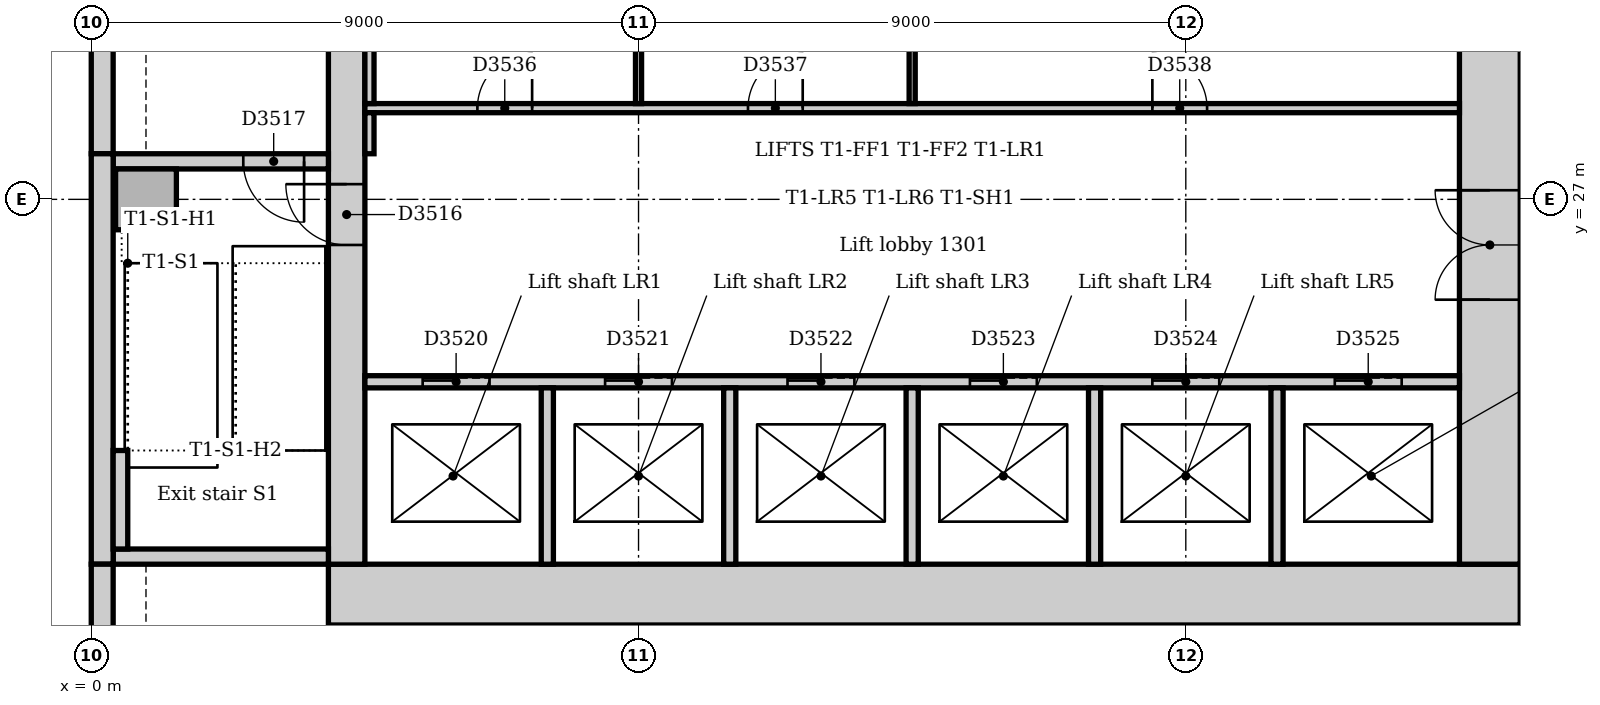
"""IFC4 building model, lengths in metres.
Left out: names, types, materials, properties, quantities, classifications, styles, units other than length and angle.
Written with IfcOpenShell. Run it as: python <this file> out.ifc"""

import sys

from ifc_helpers import new_model, si_unit, direction, frame, frame_2d, origin, origin_2d, place, context, subcontext, project, spatial, rectangle, extrude, element, fill, save


model = new_model("IFC4")
c1 = context("Model", 3, precision=1e-05, world=origin(), true_north=direction((0.0, 1.0)))
c2 = subcontext(c1, "Body", "Model", "MODEL_VIEW")
j1 = project(units=[si_unit("LENGTHUNIT", "METRE"), si_unit("PLANEANGLEUNIT", "RADIAN")], contexts=[c1])
p1 = place(None, origin())
s1 = spatial("IfcSite", under=j1, at=p1, CompositionType="ELEMENT")
p2 = place(p1, origin())
s2 = spatial("IfcBuilding", under=s1, at=p2, CompositionType="ELEMENT")
p3 = place(p2, frame((0.0, 0.0, 59.0)))
s3 = spatial("IfcBuildingStorey", under=s2, at=p3, CompositionType="ELEMENT", Elevation=59.0)
p4 = place(p3, frame((3.9, 20.5, 0.0), z_axis=(0.0, 0.0, 1.0), x_axis=(1.0, 0.0, 0.0)))
e1 = element("IfcWall", 1, at=p4, inside=s3, PredefinedType="SOLIDWALL", context=c2, shape_type="SweptSolid", body=[
    extrude(rectangle(XDim=19.6, YDim=1.0, at=frame_2d((9.8, 0.0))), origin(), (0.0, 0.0, 1.0), 4.0),
])
p5 = place(p3, frame((23.0, 21.0, 0.0), z_axis=(0.0, 0.0, 1.0), x_axis=(0.0, 1.0, 0.0)))
e2 = element("IfcWall", 2, at=p5, inside=s3, PredefinedType="SOLIDWALL", context=c2, shape_type="SweptSolid", body=[
    extrude(rectangle(XDim=10.5, YDim=1.0, at=frame_2d((5.25, 0.0))), origin(), (0.0, 0.0, 1.0), 4.0),
])
p6 = place(p5, frame((4.35, 0.0, 0.0)))
e3 = element("IfcOpeningElement", 3, at=p6, cuts=e2, PredefinedType="OPENING", context=c2, shape_type="SweptSolid", body=[
    extrude(rectangle(XDim=1.8, YDim=2.1, at=frame_2d((0.9, 1.05))), frame((0.0, 0.51, 0.0), z_axis=(0.0, -1.0, 0.0), x_axis=(1.0, 0.0, 0.0)), (0.0, 0.0, 1.0), 1.02),
])
p7 = place(p3, frame((4.2, 31.5, 0.0), z_axis=(0.0, 0.0, 1.0), x_axis=(0.0, -1.0, 0.0)))
e4 = element("IfcWall", 4, at=p7, inside=s3, PredefinedType="SOLIDWALL", context=c2, shape_type="SweptSolid", body=[
    extrude(rectangle(XDim=10.5, YDim=0.6, at=frame_2d((5.25, 0.0))), origin(), (0.0, 0.0, 1.0), 4.0),
])
p8 = place(p7, frame((4.25, 0.0, 0.0)))
e5 = element("IfcOpeningElement", 5, at=p8, cuts=e4, PredefinedType="OPENING", context=c2, shape_type="SweptSolid", body=[
    extrude(rectangle(XDim=1.0, YDim=2.1, at=frame_2d((0.5, 1.05))), frame((0.0, 0.31, 0.0), z_axis=(0.0, -1.0, 0.0), x_axis=(1.0, 0.0, 0.0)), (0.0, 0.0, 1.0), 0.62),
])
p9 = place(p3, frame((0.36, 21.125, 0.0), z_axis=(0.0, 0.0, 1.0), x_axis=(1.0, 0.0, 0.0)))
e6 = element("IfcWall", 6, at=p9, inside=s3, PredefinedType="SOLIDWALL", context=c2, shape_type="SweptSolid", body=[
    extrude(rectangle(XDim=3.54, YDim=0.25, at=frame_2d((1.77, 0.0))), origin(), (0.0, 0.0, 1.0), 4.0),
])
p10 = place(p3, frame((3.9, 27.625, 0.0), z_axis=(0.0, 0.0, 1.0), x_axis=(-1.0, 0.0, 0.0)))
e7 = element("IfcWall", 7, at=p10, inside=s3, PredefinedType="SOLIDWALL", context=c2, shape_type="SweptSolid", body=[
    extrude(rectangle(XDim=3.54, YDim=0.25, at=frame_2d((1.77, 0.0))), origin(), (0.0, 0.0, 1.0), 4.0),
])
p11 = place(p10, frame((0.4, 0.0, 0.0)))
e8 = element("IfcOpeningElement", 8, at=p11, cuts=e7, PredefinedType="OPENING", context=c2, shape_type="SweptSolid", body=[
    extrude(rectangle(XDim=1.0, YDim=2.1, at=frame_2d((0.5, 1.05))), frame((0.0, 0.135, 0.0), z_axis=(0.0, -1.0, 0.0), x_axis=(1.0, 0.0, 0.0)), (0.0, 0.0, 1.0), 0.27),
])
p12 = place(p3, frame((0.9, 27.0, 0.0), z_axis=(0.0, 0.0, 1.0), x_axis=(1.0, 0.0, 0.0)))
e9 = element("IfcColumn", 9, at=p12, inside=s3, PredefinedType="COLUMN", context=c2, shape_type="SweptSolid", body=[
    extrude(rectangle(XDim=1.0, YDim=1.0, at=origin_2d()), origin(), (0.0, 0.0, 1.0), 4.0),
])
p13 = place(p3, frame((0.18, 35.25, 0.0), z_axis=(0.0, 0.0, 1.0), x_axis=(0.0, -1.0, 0.0)))
e10 = element("IfcWall", 10, at=p13, inside=s3, PredefinedType="STANDARD", context=c2, shape_type="SweptSolid", body=[
    extrude(rectangle(XDim=7.5, YDim=0.36, at=frame_2d((3.75, 0.0))), origin(), (0.0, 0.0, 1.0), 3.85),
])
p14 = place(p3, frame((0.18, 27.75, 0.0), z_axis=(0.0, 0.0, 1.0), x_axis=(0.0, -1.0, 0.0)))
e11 = element("IfcWall", 11, at=p14, inside=s3, PredefinedType="STANDARD", context=c2, shape_type="SweptSolid", body=[
    extrude(rectangle(XDim=6.75, YDim=0.36, at=frame_2d((3.375, 0.0))), origin(), (0.0, 0.0, 1.0), 3.85),
])
p15 = place(p3, frame((0.18, 21.0, 0.0), z_axis=(0.0, 0.0, 1.0), x_axis=(0.0, -1.0, 0.0)))
e12 = element("IfcWall", 12, at=p15, inside=s3, PredefinedType="STANDARD", context=c2, shape_type="SweptSolid", body=[
    extrude(rectangle(XDim=16.757, YDim=0.36, at=frame_2d((8.379, 0.0))), origin(), (0.0, 0.0, 1.0), 3.85),
])
p16 = place(p15, frame((1.35, 0.0, 0.9)))
e13 = element("IfcOpeningElement", 13, at=p16, cuts=e12, PredefinedType="OPENING", context=c2, shape_type="SweptSolid", body=[
    extrude(rectangle(XDim=3.3, YDim=1.6, at=frame_2d((1.65, 0.8))), frame((0.0, 0.19, 0.0), z_axis=(0.0, -1.0, 0.0), x_axis=(1.0, 0.0, 0.0)), (0.0, 0.0, 1.0), 0.38),
])
p17 = place(p15, frame((5.85, 0.0, 0.9)))
e14 = element("IfcOpeningElement", 14, at=p17, cuts=e12, PredefinedType="OPENING", context=c2, shape_type="SweptSolid", body=[
    extrude(rectangle(XDim=3.3, YDim=1.6, at=frame_2d((1.65, 0.8))), frame((0.0, 0.19, 0.0), z_axis=(0.0, -1.0, 0.0), x_axis=(1.0, 0.0, 0.0)), (0.0, 0.0, 1.0), 0.38),
])
p18 = place(p15, frame((10.35, 0.0, 0.9)))
e15 = element("IfcOpeningElement", 15, at=p18, cuts=e12, PredefinedType="OPENING", context=c2, shape_type="SweptSolid", body=[
    extrude(rectangle(XDim=3.3, YDim=1.6, at=frame_2d((1.65, 0.8))), frame((0.0, 0.19, 0.0), z_axis=(0.0, -1.0, 0.0), x_axis=(1.0, 0.0, 0.0)), (0.0, 0.0, 1.0), 0.38),
])
p19 = place(p3, frame((0.48, 21.25, 0.0), z_axis=(0.0, 0.0, 1.0), x_axis=(0.0, 1.0, 0.0)))
e16 = element("IfcWall", 16, at=p19, inside=s3, PredefinedType="STANDARD", context=c2, shape_type="SweptSolid", body=[
    extrude(rectangle(XDim=1.62, YDim=0.24, at=frame_2d((0.81, 0.0))), origin(), (0.0, 0.0, 1.0), 4.0),
])
p20 = place(p3, frame((4.5, 24.0, 0.0), z_axis=(0.0, 0.0, 1.0), x_axis=(1.0, 0.0, 0.0)))
e17 = element("IfcWall", 17, at=p20, inside=s3, PredefinedType="PARTITIONING", context=c2, shape_type="SweptSolid", body=[
    extrude(rectangle(XDim=18.0, YDim=0.2, at=frame_2d((9.0, 0.0))), origin(), (0.0, 0.0, 1.0), 3.85),
])
p21 = place(p20, frame((0.95, 0.0, 0.0)))
e18 = element("IfcOpeningElement", 18, at=p21, cuts=e17, PredefinedType="OPENING", context=c2, shape_type="SweptSolid", body=[
    extrude(rectangle(XDim=1.1, YDim=2.1, at=frame_2d((0.55, 1.05))), frame((0.0, 0.11, 0.0), z_axis=(0.0, -1.0, 0.0), x_axis=(1.0, 0.0, 0.0)), (0.0, 0.0, 1.0), 0.22),
])
p22 = place(p20, frame((3.95, 0.0, 0.0)))
e19 = element("IfcOpeningElement", 19, at=p22, cuts=e17, PredefinedType="OPENING", context=c2, shape_type="SweptSolid", body=[
    extrude(rectangle(XDim=1.1, YDim=2.1, at=frame_2d((0.55, 1.05))), frame((0.0, 0.11, 0.0), z_axis=(0.0, -1.0, 0.0), x_axis=(1.0, 0.0, 0.0)), (0.0, 0.0, 1.0), 0.22),
])
p23 = place(p20, frame((6.95, 0.0, 0.0)))
e20 = element("IfcOpeningElement", 20, at=p23, cuts=e17, PredefinedType="OPENING", context=c2, shape_type="SweptSolid", body=[
    extrude(rectangle(XDim=1.1, YDim=2.1, at=frame_2d((0.55, 1.05))), frame((0.0, 0.11, 0.0), z_axis=(0.0, -1.0, 0.0), x_axis=(1.0, 0.0, 0.0)), (0.0, 0.0, 1.0), 0.22),
])
p24 = place(p20, frame((9.95, 0.0, 0.0)))
e21 = element("IfcOpeningElement", 21, at=p24, cuts=e17, PredefinedType="OPENING", context=c2, shape_type="SweptSolid", body=[
    extrude(rectangle(XDim=1.1, YDim=2.1, at=frame_2d((0.55, 1.05))), frame((0.0, 0.11, 0.0), z_axis=(0.0, -1.0, 0.0), x_axis=(1.0, 0.0, 0.0)), (0.0, 0.0, 1.0), 0.22),
])
p25 = place(p20, frame((12.95, 0.0, 0.0)))
e22 = element("IfcOpeningElement", 22, at=p25, cuts=e17, PredefinedType="OPENING", context=c2, shape_type="SweptSolid", body=[
    extrude(rectangle(XDim=1.1, YDim=2.1, at=frame_2d((0.55, 1.05))), frame((0.0, 0.11, 0.0), z_axis=(0.0, -1.0, 0.0), x_axis=(1.0, 0.0, 0.0)), (0.0, 0.0, 1.0), 0.22),
])
p26 = place(p20, frame((15.95, 0.0, 0.0)))
e23 = element("IfcOpeningElement", 23, at=p26, cuts=e17, PredefinedType="OPENING", context=c2, shape_type="SweptSolid", body=[
    extrude(rectangle(XDim=1.1, YDim=2.1, at=frame_2d((0.55, 1.05))), frame((0.0, 0.11, 0.0), z_axis=(0.0, -1.0, 0.0), x_axis=(1.0, 0.0, 0.0)), (0.0, 0.0, 1.0), 0.22),
])
for number, where, z_axis, x_axis in (
    (24, (7.5, 21.0, 0.0), (0.0, 0.0, 1.0), (0.0, 1.0, 0.0)),
    (25, (10.5, 21.0, 0.0), (0.0, 0.0, 1.0), (0.0, 1.0, 0.0)),
    (26, (13.5, 21.0, 0.0), (0.0, 0.0, 1.0), (0.0, 1.0, 0.0)),
    (27, (16.5, 21.0, 0.0), (0.0, 0.0, 1.0), (0.0, 1.0, 0.0)),
    (28, (19.5, 21.0, 0.0), (0.0, 0.0, 1.0), (0.0, 1.0, 0.0)),
):
    element("IfcWall", number, at=place(p3, frame(where, z_axis=z_axis, x_axis=x_axis)), inside=s3, PredefinedType="PARTITIONING", context=c2, shape_type="SweptSolid", body=[
        extrude(rectangle(XDim=2.9, YDim=0.2, at=frame_2d((1.45, 0.0))), origin(), (0.0, 0.0, 1.0), 3.85),
    ])
p27 = place(p3, frame((4.5, 28.5, 0.0), z_axis=(0.0, 0.0, 1.0), x_axis=(1.0, 0.0, 0.0)))
e29 = element("IfcWall", 29, at=p27, inside=s3, PredefinedType="PARTITIONING", context=c2, shape_type="SweptSolid", body=[
    extrude(rectangle(XDim=18.0, YDim=0.15, at=frame_2d((9.0, 0.0))), origin(), (0.0, 0.0, 1.0), 3.85),
])
p28 = place(p27, frame((1.85, 0.0, 0.0)))
e30 = element("IfcOpeningElement", 30, at=p28, cuts=e29, PredefinedType="OPENING", context=c2, shape_type="SweptSolid", body=[
    extrude(rectangle(XDim=0.9, YDim=2.1, at=frame_2d((0.45, 1.05))), frame((0.0, 0.085, 0.0), z_axis=(0.0, -1.0, 0.0), x_axis=(1.0, 0.0, 0.0)), (0.0, 0.0, 1.0), 0.17),
])
p29 = place(p27, frame((6.3, 0.0, 0.0)))
e31 = element("IfcOpeningElement", 31, at=p29, cuts=e29, PredefinedType="OPENING", context=c2, shape_type="SweptSolid", body=[
    extrude(rectangle(XDim=0.9, YDim=2.1, at=frame_2d((0.45, 1.05))), frame((0.0, 0.085, 0.0), z_axis=(0.0, -1.0, 0.0), x_axis=(1.0, 0.0, 0.0)), (0.0, 0.0, 1.0), 0.17),
])
p30 = place(p27, frame((12.95, 0.0, 0.0)))
e32 = element("IfcOpeningElement", 32, at=p30, cuts=e29, PredefinedType="OPENING", context=c2, shape_type="SweptSolid", body=[
    extrude(rectangle(XDim=0.9, YDim=2.1, at=frame_2d((0.45, 1.05))), frame((0.0, 0.085, 0.0), z_axis=(0.0, -1.0, 0.0), x_axis=(1.0, 0.0, 0.0)), (0.0, 0.0, 1.0), 0.17),
])
p31 = place(p3, frame((4.575, 27.75, 0.0), z_axis=(0.0, 0.0, 1.0), x_axis=(0.0, 1.0, 0.0)))
e33 = element("IfcWall", 33, at=p31, inside=s3, PredefinedType="PARTITIONING", context=c2, shape_type="SweptSolid", body=[
    extrude(rectangle(XDim=0.675, YDim=0.15, at=frame_2d((0.338, 0.0))), origin(), (0.0, 0.0, 1.0), 3.85),
])
p32 = place(p3, frame((4.575, 28.575, 0.0), z_axis=(0.0, 0.0, 1.0), x_axis=(0.0, 1.0, 0.0)))
e34 = element("IfcWall", 34, at=p32, inside=s3, PredefinedType="PARTITIONING", context=c2, shape_type="SweptSolid", body=[
    extrude(rectangle(XDim=2.675, YDim=0.15, at=frame_2d((1.337, 0.0))), origin(), (0.0, 0.0, 1.0), 3.85),
])
for number, where, z_axis, x_axis in (
    (35, (9.0, 28.575, 0.0), (0.0, 0.0, 1.0), (0.0, 1.0, 0.0)),
    (36, (13.5, 28.575, 0.0), (0.0, 0.0, 1.0), (0.0, 1.0, 0.0)),
):
    element("IfcWall", number, at=place(p3, frame(where, z_axis=z_axis, x_axis=x_axis)), inside=s3, PredefinedType="PARTITIONING", context=c2, shape_type="SweptSolid", body=[
        extrude(rectangle(XDim=2.675, YDim=0.1, at=frame_2d((1.337, 0.0))), origin(), (0.0, 0.0, 1.0), 3.85),
    ])
p33 = place(p8, frame((1.0, 0.0, 0.0), z_axis=(0.0, 0.0, 1.0), x_axis=(-1.0, 0.0, 0.0)))
e37 = element("IfcDoor", 37, at=p33, inside=s3, OperationType="SINGLE_SWING_RIGHT", PredefinedType="DOOR", context=c2, shape_type="SweptSolid", body=[
    extrude(rectangle(XDim=1.0, YDim=2.1, at=frame_2d((0.5, 1.05))), frame((0.0, 0.025, 0.0), z_axis=(0.0, -1.0, 0.0), x_axis=(1.0, 0.0, 0.0)), (0.0, 0.0, 1.0), 0.05),
])
fill(e5, e37)
p34 = place(p11, origin())
e38 = element("IfcDoor", 38, at=p34, inside=s3, OperationType="SINGLE_SWING_LEFT", PredefinedType="DOOR", context=c2, shape_type="SweptSolid", body=[
    extrude(rectangle(XDim=1.0, YDim=2.1, at=frame_2d((0.5, 1.05))), frame((0.0, 0.025, 0.0), z_axis=(0.0, -1.0, 0.0), x_axis=(1.0, 0.0, 0.0)), (0.0, 0.0, 1.0), 0.05),
])
fill(e8, e38)
p35 = place(p21, origin())
e39 = element("IfcDoor", 39, at=p35, inside=s3, OperationType="SLIDING_TO_LEFT", PredefinedType="DOOR", context=c2, shape_type="SweptSolid", body=[
    extrude(rectangle(XDim=1.1, YDim=2.1, at=frame_2d((0.55, 1.05))), frame((0.0, 0.025, 0.0), z_axis=(0.0, -1.0, 0.0), x_axis=(1.0, 0.0, 0.0)), (0.0, 0.0, 1.0), 0.05),
])
fill(e18, e39)
p36 = place(p22, origin())
e40 = element("IfcDoor", 40, at=p36, inside=s3, OperationType="SLIDING_TO_LEFT", PredefinedType="DOOR", context=c2, shape_type="SweptSolid", body=[
    extrude(rectangle(XDim=1.1, YDim=2.1, at=frame_2d((0.55, 1.05))), frame((0.0, 0.025, 0.0), z_axis=(0.0, -1.0, 0.0), x_axis=(1.0, 0.0, 0.0)), (0.0, 0.0, 1.0), 0.05),
])
fill(e19, e40)
p37 = place(p23, origin())
e41 = element("IfcDoor", 41, at=p37, inside=s3, OperationType="SLIDING_TO_LEFT", PredefinedType="DOOR", context=c2, shape_type="SweptSolid", body=[
    extrude(rectangle(XDim=1.1, YDim=2.1, at=frame_2d((0.55, 1.05))), frame((0.0, 0.025, 0.0), z_axis=(0.0, -1.0, 0.0), x_axis=(1.0, 0.0, 0.0)), (0.0, 0.0, 1.0), 0.05),
])
fill(e20, e41)
p38 = place(p24, origin())
e42 = element("IfcDoor", 42, at=p38, inside=s3, OperationType="SLIDING_TO_LEFT", PredefinedType="DOOR", context=c2, shape_type="SweptSolid", body=[
    extrude(rectangle(XDim=1.1, YDim=2.1, at=frame_2d((0.55, 1.05))), frame((0.0, 0.025, 0.0), z_axis=(0.0, -1.0, 0.0), x_axis=(1.0, 0.0, 0.0)), (0.0, 0.0, 1.0), 0.05),
])
fill(e21, e42)
p39 = place(p25, origin())
e43 = element("IfcDoor", 43, at=p39, inside=s3, OperationType="SLIDING_TO_LEFT", PredefinedType="DOOR", context=c2, shape_type="SweptSolid", body=[
    extrude(rectangle(XDim=1.1, YDim=2.1, at=frame_2d((0.55, 1.05))), frame((0.0, 0.025, 0.0), z_axis=(0.0, -1.0, 0.0), x_axis=(1.0, 0.0, 0.0)), (0.0, 0.0, 1.0), 0.05),
])
fill(e22, e43)
p40 = place(p26, origin())
e44 = element("IfcDoor", 44, at=p40, inside=s3, OperationType="SLIDING_TO_LEFT", PredefinedType="DOOR", context=c2, shape_type="SweptSolid", body=[
    extrude(rectangle(XDim=1.1, YDim=2.1, at=frame_2d((0.55, 1.05))), frame((0.0, 0.025, 0.0), z_axis=(0.0, -1.0, 0.0), x_axis=(1.0, 0.0, 0.0)), (0.0, 0.0, 1.0), 0.05),
])
fill(e23, e44)
p41 = place(p6, origin())
e45 = element("IfcDoor", 45, at=p41, inside=s3, OperationType="DOUBLE_DOOR_DOUBLE_SWING", PredefinedType="DOOR", context=c2, shape_type="SweptSolid", body=[
    extrude(rectangle(XDim=1.8, YDim=2.1, at=frame_2d((0.9, 1.05))), frame((0.0, 0.025, 0.0), z_axis=(0.0, -1.0, 0.0), x_axis=(1.0, 0.0, 0.0)), (0.0, 0.0, 1.0), 0.05),
])
fill(e3, e45)
p42 = place(p28, origin())
e46 = element("IfcDoor", 46, at=p42, inside=s3, OperationType="SINGLE_SWING_RIGHT", PredefinedType="DOOR", context=c2, shape_type="SweptSolid", body=[
    extrude(rectangle(XDim=0.9, YDim=2.1, at=frame_2d((0.45, 1.05))), frame((0.0, 0.025, 0.0), z_axis=(0.0, -1.0, 0.0), x_axis=(1.0, 0.0, 0.0)), (0.0, 0.0, 1.0), 0.05),
])
fill(e30, e46)
p43 = place(p29, origin())
e47 = element("IfcDoor", 47, at=p43, inside=s3, OperationType="SINGLE_SWING_RIGHT", PredefinedType="DOOR", context=c2, shape_type="SweptSolid", body=[
    extrude(rectangle(XDim=0.9, YDim=2.1, at=frame_2d((0.45, 1.05))), frame((0.0, 0.025, 0.0), z_axis=(0.0, -1.0, 0.0), x_axis=(1.0, 0.0, 0.0)), (0.0, 0.0, 1.0), 0.05),
])
fill(e31, e47)
p44 = place(p30, origin())
e48 = element("IfcDoor", 48, at=p44, inside=s3, OperationType="SINGLE_SWING_LEFT", PredefinedType="DOOR", context=c2, shape_type="SweptSolid", body=[
    extrude(rectangle(XDim=0.9, YDim=2.1, at=frame_2d((0.45, 1.05))), frame((0.0, 0.025, 0.0), z_axis=(0.0, -1.0, 0.0), x_axis=(1.0, 0.0, 0.0)), (0.0, 0.0, 1.0), 0.05),
])
fill(e32, e48)
save(model, sys.argv[1])
